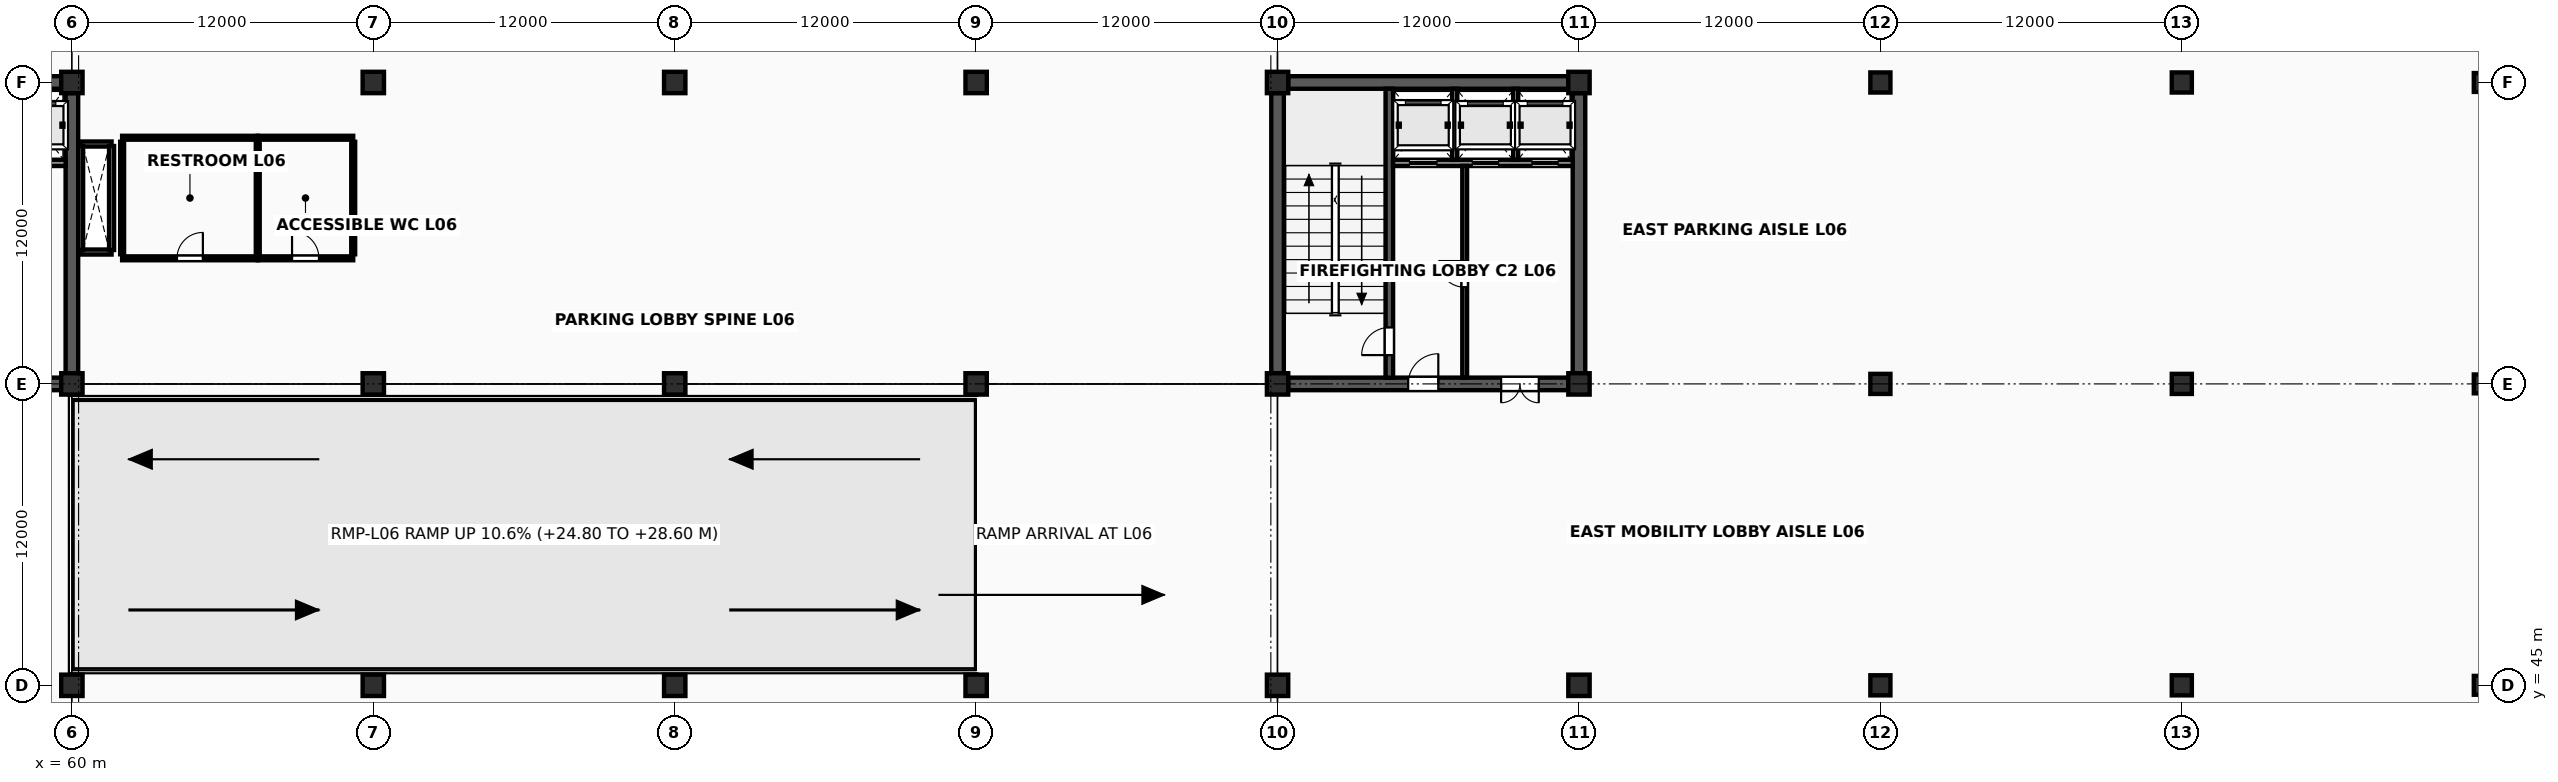
"""IFC4 building model, lengths in metres.
Left out: names, types, materials, properties, quantities, classifications, styles, units other than length and angle.
Written with IfcOpenShell. Run it as: python <this file> out.ifc"""

import sys

from ifc_helpers import new_model, si_unit, direction, frame, frame_2d, origin, origin_2d, place, context, subcontext, project, spatial, rectangle, extrude, element, fill, save


model = new_model("IFC4")
c1 = context("Model", 3, precision=1e-05, world=origin(), true_north=direction((0.0, 1.0)))
c2 = subcontext(c1, "Body", "Model", "MODEL_VIEW")
j1 = project(units=[si_unit("LENGTHUNIT", "METRE"), si_unit("PLANEANGLEUNIT", "RADIAN")], contexts=[c1])
p1 = place(None, origin())
s1 = spatial("IfcSite", under=j1, at=p1, CompositionType="ELEMENT")
p2 = place(p1, origin())
s2 = spatial("IfcBuilding", under=s1, at=p2, CompositionType="ELEMENT")
p3 = place(p2, frame((0.0, 0.0, 24.8)))
s3 = spatial("IfcBuildingStorey", under=s2, at=p3, CompositionType="ELEMENT", Elevation=24.8)
for number, where, z_axis, x_axis in (
    (1, (60.0, 45.0, 0.0), (0.0, 0.0, 1.0), (1.0, 0.0, 0.0)),
    (2, (60.0, 57.0, 0.0), (0.0, 0.0, 1.0), (1.0, 0.0, 0.0)),
    (3, (60.0, 69.0, 0.0), (0.0, 0.0, 1.0), (1.0, 0.0, 0.0)),
    (4, (72.0, 45.0, 0.0), (0.0, 0.0, 1.0), (1.0, 0.0, 0.0)),
    (5, (72.0, 57.0, 0.0), (0.0, 0.0, 1.0), (1.0, 0.0, 0.0)),
    (6, (72.0, 69.0, 0.0), (0.0, 0.0, 1.0), (1.0, 0.0, 0.0)),
    (7, (84.0, 45.0, 0.0), (0.0, 0.0, 1.0), (1.0, 0.0, 0.0)),
    (8, (84.0, 57.0, 0.0), (0.0, 0.0, 1.0), (1.0, 0.0, 0.0)),
    (9, (84.0, 69.0, 0.0), (0.0, 0.0, 1.0), (1.0, 0.0, 0.0)),
    (10, (96.0, 45.0, 0.0), (0.0, 0.0, 1.0), (1.0, 0.0, 0.0)),
    (11, (96.0, 57.0, 0.0), (0.0, 0.0, 1.0), (1.0, 0.0, 0.0)),
    (12, (96.0, 69.0, 0.0), (0.0, 0.0, 1.0), (1.0, 0.0, 0.0)),
    (13, (108.0, 45.0, 0.0), (0.0, 0.0, 1.0), (1.0, 0.0, 0.0)),
    (14, (108.0, 57.0, 0.0), (0.0, 0.0, 1.0), (1.0, 0.0, 0.0)),
    (15, (108.0, 69.0, 0.0), (0.0, 0.0, 1.0), (1.0, 0.0, 0.0)),
    (16, (120.0, 45.0, 0.0), (0.0, 0.0, 1.0), (1.0, 0.0, 0.0)),
    (17, (120.0, 57.0, 0.0), (0.0, 0.0, 1.0), (1.0, 0.0, 0.0)),
    (18, (120.0, 69.0, 0.0), (0.0, 0.0, 1.0), (1.0, 0.0, 0.0)),
):
    element("IfcColumn", number, at=place(p3, frame(where, z_axis=z_axis, x_axis=x_axis)), inside=s3, PredefinedType="COLUMN", context=c2, shape_type="SweptSolid", body=[
        extrude(rectangle(XDim=0.85, YDim=0.85, at=origin_2d()), origin(), (0.0, 0.0, 1.0), 3.8),
    ])
for number, where, z_axis, x_axis in (
    (19, (132.0, 45.0, 0.0), (0.0, 0.0, 1.0), (1.0, 0.0, 0.0)),
    (20, (132.0, 57.0, 0.0), (0.0, 0.0, 1.0), (1.0, 0.0, 0.0)),
    (21, (132.0, 69.0, 0.0), (0.0, 0.0, 1.0), (1.0, 0.0, 0.0)),
    (22, (144.0, 45.0, 0.0), (0.0, 0.0, 1.0), (1.0, 0.0, 0.0)),
    (23, (144.0, 57.0, 0.0), (0.0, 0.0, 1.0), (1.0, 0.0, 0.0)),
    (24, (144.0, 69.0, 0.0), (0.0, 0.0, 1.0), (1.0, 0.0, 0.0)),
):
    element("IfcColumn", number, at=place(p3, frame(where, z_axis=z_axis, x_axis=x_axis)), inside=s3, PredefinedType="COLUMN", context=c2, shape_type="SweptSolid", body=[
        extrude(rectangle(XDim=0.8, YDim=0.8, at=origin_2d()), origin(), (0.0, 0.0, 1.0), 3.8),
    ])
for number, where, z_axis, x_axis in (
    (25, (156.0, 45.0, 0.0), (0.0, 0.0, 1.0), (1.0, 0.0, 0.0)),
    (26, (156.0, 57.0, 0.0), (0.0, 0.0, 1.0), (1.0, 0.0, 0.0)),
    (27, (156.0, 69.0, 0.0), (0.0, 0.0, 1.0), (1.0, 0.0, 0.0)),
):
    element("IfcColumn", number, at=place(p3, frame(where, z_axis=z_axis, x_axis=x_axis)), inside=s3, PredefinedType="COLUMN", context=c2, shape_type="SweptSolid", body=[
        extrude(rectangle(XDim=0.75, YDim=0.75, at=origin_2d()), origin(), (0.0, 0.0, 1.0), 3.8),
    ])
for number, where, z_axis, x_axis in (
    (28, (60.347, 62.25, 0.0), (0.0, 0.0, 1.0), (1.0, 0.0, 0.0)),
    (29, (60.347, 66.55, 0.0), (0.0, 0.0, 1.0), (1.0, 0.0, 0.0)),
):
    element("IfcWall", number, at=place(p3, frame(where, z_axis=z_axis, x_axis=x_axis)), inside=s3, PredefinedType="SOLIDWALL", context=c2, shape_type="SweptSolid", body=[
        extrude(rectangle(XDim=1.233, YDim=0.2, at=frame_2d((0.617, 0.0))), origin(), (0.0, 0.0, 1.0), 3.628),
    ])
for number, where, z_axis, x_axis in (
    (30, (60.347, 62.33, 0.0), (0.0, 0.0, 1.0), (0.0, 1.0, 0.0)),
    (31, (61.58, 62.33, 0.0), (0.0, 0.0, 1.0), (0.0, 1.0, 0.0)),
):
    element("IfcWall", number, at=place(p3, frame(where, z_axis=z_axis, x_axis=x_axis)), inside=s3, PredefinedType="SOLIDWALL", context=c2, shape_type="SweptSolid", body=[
        extrude(rectangle(XDim=4.14, YDim=0.2, at=frame_2d((2.07, 0.0))), origin(), (0.0, 0.0, 1.0), 3.628),
    ])
p4 = place(p3, frame((48.422, 57.0, 0.0), z_axis=(0.0, 0.0, 1.0), x_axis=(1.0, 0.0, 0.0)))
e32 = element("IfcWall", 32, at=p4, inside=s3, PredefinedType="SHEAR", context=c2, shape_type="SweptSolid", body=[
    extrude(rectangle(XDim=11.156, YDim=0.5, at=frame_2d((5.578, 0.0))), origin(), (0.0, 0.0, 1.0), 3.628),
])
p5 = place(p4, frame((4.778, 0.0, 0.0)))
e33 = element("IfcOpeningElement", 33, at=p5, cuts=e32, PredefinedType="OPENING", context=c2, shape_type="SweptSolid", body=[
    extrude(rectangle(XDim=1.2, YDim=2.2, at=frame_2d((0.6, 1.1))), frame((0.0, 0.265, 0.0), z_axis=(0.0, -1.0, 0.0), x_axis=(1.0, 0.0, 0.0)), (0.0, 0.0, 1.0), 0.53),
])
p6 = place(p4, frame((8.478, 0.0, 0.0)))
e34 = element("IfcOpeningElement", 34, at=p6, cuts=e32, PredefinedType="OPENING", context=c2, shape_type="SweptSolid", body=[
    extrude(rectangle(XDim=1.5, YDim=2.25, at=frame_2d((0.75, 1.125))), frame((0.0, 0.265, 0.0), z_axis=(0.0, -1.0, 0.0), x_axis=(1.0, 0.0, 0.0)), (0.0, 0.0, 1.0), 0.53),
])
for number, where, z_axis, x_axis in (
    (35, (48.422, 69.0, 0.0), (0.0, 0.0, 1.0), (1.0, 0.0, 0.0)),
    (36, (60.0, 57.422, 0.0), (0.0, 0.0, 1.0), (0.0, 1.0, 0.0)),
):
    element("IfcWall", number, at=place(p3, frame(where, z_axis=z_axis, x_axis=x_axis)), inside=s3, PredefinedType="SHEAR", context=c2, shape_type="SweptSolid", body=[
        extrude(rectangle(XDim=11.156, YDim=0.5, at=frame_2d((5.578, 0.0))), origin(), (0.0, 0.0, 1.0), 3.628),
    ])
p7 = place(p3, frame((52.597, 65.8, 0.0), z_axis=(0.0, 0.0, 1.0), x_axis=(1.0, 0.0, 0.0)))
e37 = element("IfcWall", 37, at=p7, inside=s3, PredefinedType="SOLIDWALL", context=c2, shape_type="SweptSolid", body=[
    extrude(rectangle(XDim=7.156, YDim=0.25, at=frame_2d((3.578, 0.0))), origin(), (0.0, 0.0, 1.0), 3.628),
])
p8 = place(p7, frame((0.653, 0.0, 0.0)))
e38 = element("IfcOpeningElement", 38, at=p8, cuts=e37, PredefinedType="OPENING", context=c2, shape_type="SweptSolid", body=[
    extrude(rectangle(XDim=1.1, YDim=2.24, at=frame_2d((0.55, 1.12))), frame((0.0, 0.14, 0.0), z_axis=(0.0, -1.0, 0.0), x_axis=(1.0, 0.0, 0.0)), (0.0, 0.0, 1.0), 0.28),
])
p9 = place(p7, frame((3.153, 0.0, 0.0)))
e39 = element("IfcOpeningElement", 39, at=p9, cuts=e37, PredefinedType="OPENING", context=c2, shape_type="SweptSolid", body=[
    extrude(rectangle(XDim=1.05, YDim=2.2, at=frame_2d((0.525, 1.1))), frame((0.0, 0.14, 0.0), z_axis=(0.0, -1.0, 0.0), x_axis=(1.0, 0.0, 0.0)), (0.0, 0.0, 1.0), 0.28),
])
p10 = place(p7, frame((5.528, 0.0, 0.0)))
e40 = element("IfcOpeningElement", 40, at=p10, cuts=e37, PredefinedType="OPENING", context=c2, shape_type="SweptSolid", body=[
    extrude(rectangle(XDim=1.05, YDim=2.2, at=frame_2d((0.525, 1.1))), frame((0.0, 0.14, 0.0), z_axis=(0.0, -1.0, 0.0), x_axis=(1.0, 0.0, 0.0)), (0.0, 0.0, 1.0), 0.28),
])
p11 = place(p3, frame((108.422, 57.0, 0.0), z_axis=(0.0, 0.0, 1.0), x_axis=(1.0, 0.0, 0.0)))
e41 = element("IfcWall", 41, at=p11, inside=s3, PredefinedType="SHEAR", context=c2, shape_type="SweptSolid", body=[
    extrude(rectangle(XDim=11.156, YDim=0.5, at=frame_2d((5.578, 0.0))), origin(), (0.0, 0.0, 1.0), 3.628),
])
p12 = place(p11, frame((4.778, 0.0, 0.0)))
e42 = element("IfcOpeningElement", 42, at=p12, cuts=e41, PredefinedType="OPENING", context=c2, shape_type="SweptSolid", body=[
    extrude(rectangle(XDim=1.2, YDim=2.2, at=frame_2d((0.6, 1.1))), frame((0.0, 0.265, 0.0), z_axis=(0.0, -1.0, 0.0), x_axis=(1.0, 0.0, 0.0)), (0.0, 0.0, 1.0), 0.53),
])
p13 = place(p11, frame((8.478, 0.0, 0.0)))
e43 = element("IfcOpeningElement", 43, at=p13, cuts=e41, PredefinedType="OPENING", context=c2, shape_type="SweptSolid", body=[
    extrude(rectangle(XDim=1.5, YDim=2.25, at=frame_2d((0.75, 1.125))), frame((0.0, 0.265, 0.0), z_axis=(0.0, -1.0, 0.0), x_axis=(1.0, 0.0, 0.0)), (0.0, 0.0, 1.0), 0.53),
])
for number, where, z_axis, x_axis in (
    (44, (108.422, 69.0, 0.0), (0.0, 0.0, 1.0), (1.0, 0.0, 0.0)),
    (45, (108.0, 57.422, 0.0), (0.0, 0.0, 1.0), (0.0, 1.0, 0.0)),
    (46, (120.0, 57.422, 0.0), (0.0, 0.0, 1.0), (0.0, 1.0, 0.0)),
):
    element("IfcWall", number, at=place(p3, frame(where, z_axis=z_axis, x_axis=x_axis)), inside=s3, PredefinedType="SHEAR", context=c2, shape_type="SweptSolid", body=[
        extrude(rectangle(XDim=11.156, YDim=0.5, at=frame_2d((5.578, 0.0))), origin(), (0.0, 0.0, 1.0), 3.628),
    ])
p14 = place(p3, frame((112.45, 57.247, 0.0), z_axis=(0.0, 0.0, 1.0), x_axis=(0.0, 1.0, 0.0)))
e47 = element("IfcWall", 47, at=p14, inside=s3, PredefinedType="SHEAR", context=c2, shape_type="SweptSolid", body=[
    extrude(rectangle(XDim=11.506, YDim=0.3, at=frame_2d((5.753, 0.0))), origin(), (0.0, 0.0, 1.0), 3.628),
])
p15 = place(p14, frame((0.9, 0.0, 0.0)))
e48 = element("IfcOpeningElement", 48, at=p15, cuts=e47, PredefinedType="OPENING", context=c2, shape_type="SweptSolid", body=[
    extrude(rectangle(XDim=1.1, YDim=2.2, at=frame_2d((0.55, 1.1))), frame((0.0, 0.165, 0.0), z_axis=(0.0, -1.0, 0.0), x_axis=(1.0, 0.0, 0.0)), (0.0, 0.0, 1.0), 0.33),
])
p16 = place(p3, frame((112.597, 65.8, 0.0), z_axis=(0.0, 0.0, 1.0), x_axis=(1.0, 0.0, 0.0)))
e49 = element("IfcWall", 49, at=p16, inside=s3, PredefinedType="SOLIDWALL", context=c2, shape_type="SweptSolid", body=[
    extrude(rectangle(XDim=7.156, YDim=0.25, at=frame_2d((3.578, 0.0))), origin(), (0.0, 0.0, 1.0), 3.628),
])
p17 = place(p16, frame((0.653, 0.0, 0.0)))
e50 = element("IfcOpeningElement", 50, at=p17, cuts=e49, PredefinedType="OPENING", context=c2, shape_type="SweptSolid", body=[
    extrude(rectangle(XDim=1.1, YDim=2.24, at=frame_2d((0.55, 1.12))), frame((0.0, 0.14, 0.0), z_axis=(0.0, -1.0, 0.0), x_axis=(1.0, 0.0, 0.0)), (0.0, 0.0, 1.0), 0.28),
])
p18 = place(p16, frame((3.153, 0.0, 0.0)))
e51 = element("IfcOpeningElement", 51, at=p18, cuts=e49, PredefinedType="OPENING", context=c2, shape_type="SweptSolid", body=[
    extrude(rectangle(XDim=1.05, YDim=2.2, at=frame_2d((0.525, 1.1))), frame((0.0, 0.14, 0.0), z_axis=(0.0, -1.0, 0.0), x_axis=(1.0, 0.0, 0.0)), (0.0, 0.0, 1.0), 0.28),
])
p19 = place(p16, frame((5.528, 0.0, 0.0)))
e52 = element("IfcOpeningElement", 52, at=p19, cuts=e49, PredefinedType="OPENING", context=c2, shape_type="SweptSolid", body=[
    extrude(rectangle(XDim=1.05, YDim=2.2, at=frame_2d((0.525, 1.1))), frame((0.0, 0.14, 0.0), z_axis=(0.0, -1.0, 0.0), x_axis=(1.0, 0.0, 0.0)), (0.0, 0.0, 1.0), 0.28),
])
for number, where, z_axis, x_axis in (
    (53, (115.05, 65.92, 0.0), (0.0, 0.0, 1.0), (0.0, 1.0, 0.0)),
    (54, (117.48, 65.92, 0.0), (0.0, 0.0, 1.0), (0.0, 1.0, 0.0)),
):
    element("IfcWall", number, at=place(p3, frame(where, z_axis=z_axis, x_axis=x_axis)), inside=s3, PredefinedType="SOLIDWALL", context=c2, shape_type="SweptSolid", body=[
        extrude(rectangle(XDim=2.83, YDim=0.2, at=frame_2d((1.415, 0.0))), origin(), (0.0, 0.0, 1.0), 3.618),
    ])
p20 = place(p3, frame((115.45, 57.25, 0.0), z_axis=(0.0, 0.0, 1.0), x_axis=(0.0, 1.0, 0.0)))
e55 = element("IfcWall", 55, at=p20, inside=s3, PredefinedType="SOLIDWALL", context=c2, shape_type="SweptSolid", body=[
    extrude(rectangle(XDim=8.43, YDim=0.19, at=frame_2d((4.215, 0.0))), origin(), (0.0, 0.0, 1.0), 3.618),
])
p21 = place(p20, frame((3.6, 0.0, 0.0)))
e56 = element("IfcOpeningElement", 56, at=p21, cuts=e55, PredefinedType="OPENING", context=c2, shape_type="SweptSolid", body=[
    extrude(rectangle(XDim=1.04, YDim=2.18, at=frame_2d((0.52, 1.09))), frame((0.0, 0.11, 0.0), z_axis=(0.0, -1.0, 0.0), x_axis=(1.0, 0.0, 0.0)), (0.0, 0.0, 1.0), 0.22),
])
p22 = place(p3, frame((62.0, 62.0, 0.0), z_axis=(0.0, 0.0, 1.0), x_axis=(1.0, 0.0, 0.0)))
e57 = element("IfcWall", 57, at=p22, inside=s3, PredefinedType="PLUMBINGWALL", context=c2, shape_type="SweptSolid", body=[
    extrude(rectangle(XDim=5.4, YDim=0.155, at=frame_2d((2.7, 0.0))), origin(), (0.0, 0.0, 1.0), 2.75),
])
p23 = place(p22, frame((2.185, 0.0, 0.0)))
e58 = element("IfcOpeningElement", 58, at=p23, cuts=e57, PredefinedType="OPENING", context=c2, shape_type="SweptSolid", body=[
    extrude(rectangle(XDim=1.03, YDim=2.17, at=frame_2d((0.515, 1.085))), frame((0.0, 0.093, 0.0), z_axis=(0.0, -1.0, 0.0), x_axis=(1.0, 0.0, 0.0)), (0.0, 0.0, 1.0), 0.185),
])
p24 = place(p3, frame((62.0, 66.8, 0.0), z_axis=(0.0, 0.0, 1.0), x_axis=(1.0, 0.0, 0.0)))
e59 = element("IfcWall", 59, at=p24, inside=s3, PredefinedType="PLUMBINGWALL", context=c2, shape_type="SweptSolid", body=[
    extrude(rectangle(XDim=5.4, YDim=0.155, at=frame_2d((2.7, 0.0))), origin(), (0.0, 0.0, 1.0), 2.75),
])
for number, where, z_axis, x_axis in (
    (60, (62.0, 62.16, 0.0), (0.0, 0.0, 1.0), (0.0, 1.0, 0.0)),
    (61, (67.4, 62.16, 0.0), (0.0, 0.0, 1.0), (0.0, 1.0, 0.0)),
):
    element("IfcWall", number, at=place(p3, frame(where, z_axis=z_axis, x_axis=x_axis)), inside=s3, PredefinedType="PLUMBINGWALL", context=c2, shape_type="SweptSolid", body=[
        extrude(rectangle(XDim=4.48, YDim=0.155, at=frame_2d((2.24, 0.0))), origin(), (0.0, 0.0, 1.0), 2.75),
    ])
p25 = place(p3, frame((67.4, 62.0, 0.0), z_axis=(0.0, 0.0, 1.0), x_axis=(1.0, 0.0, 0.0)))
e62 = element("IfcWall", 62, at=p25, inside=s3, PredefinedType="PLUMBINGWALL", context=c2, shape_type="SweptSolid", body=[
    extrude(rectangle(XDim=3.8, YDim=0.155, at=frame_2d((1.9, 0.0))), origin(), (0.0, 0.0, 1.0), 2.75),
])
p26 = place(p25, frame((1.365, 0.0, 0.0)))
e63 = element("IfcOpeningElement", 63, at=p26, cuts=e62, PredefinedType="OPENING", context=c2, shape_type="SweptSolid", body=[
    extrude(rectangle(XDim=1.07, YDim=2.19, at=frame_2d((0.535, 1.095))), frame((0.0, 0.093, 0.0), z_axis=(0.0, -1.0, 0.0), x_axis=(1.0, 0.0, 0.0)), (0.0, 0.0, 1.0), 0.185),
])
p27 = place(p3, frame((67.4, 66.8, 0.0), z_axis=(0.0, 0.0, 1.0), x_axis=(1.0, 0.0, 0.0)))
e64 = element("IfcWall", 64, at=p27, inside=s3, PredefinedType="PLUMBINGWALL", context=c2, shape_type="SweptSolid", body=[
    extrude(rectangle(XDim=3.8, YDim=0.155, at=frame_2d((1.9, 0.0))), origin(), (0.0, 0.0, 1.0), 2.75),
])
p28 = place(p3, frame((71.2, 62.16, 0.0), z_axis=(0.0, 0.0, 1.0), x_axis=(0.0, 1.0, 0.0)))
e65 = element("IfcWall", 65, at=p28, inside=s3, PredefinedType="PLUMBINGWALL", context=c2, shape_type="SweptSolid", body=[
    extrude(rectangle(XDim=4.48, YDim=0.155, at=frame_2d((2.24, 0.0))), origin(), (0.0, 0.0, 1.0), 2.75),
])
p29 = place(p15, origin())
e66 = element("IfcDoor", 66, at=p29, inside=s3, OperationType="SINGLE_SWING_LEFT", PredefinedType="DOOR", context=c2, shape_type="SweptSolid", body=[
    extrude(rectangle(XDim=1.1, YDim=2.2, at=frame_2d((0.55, 1.1))), frame((0.0, 0.025, 0.0), z_axis=(0.0, -1.0, 0.0), x_axis=(1.0, 0.0, 0.0)), (0.0, 0.0, 1.0), 0.05),
])
fill(e48, e66)
p30 = place(p21, origin())
e67 = element("IfcDoor", 67, at=p30, inside=s3, OperationType="SINGLE_SWING_RIGHT", PredefinedType="DOOR", context=c2, shape_type="SweptSolid", body=[
    extrude(rectangle(XDim=1.04, YDim=2.18, at=frame_2d((0.52, 1.09))), frame((0.0, 0.025, 0.0), z_axis=(0.0, -1.0, 0.0), x_axis=(1.0, 0.0, 0.0)), (0.0, 0.0, 1.0), 0.05),
])
fill(e56, e67)
p31 = place(p12, origin())
e68 = element("IfcDoor", 68, at=p31, inside=s3, OperationType="SINGLE_SWING_RIGHT", PredefinedType="DOOR", context=c2, shape_type="SweptSolid", body=[
    extrude(rectangle(XDim=1.2, YDim=2.2, at=frame_2d((0.6, 1.1))), frame((0.0, 0.025, 0.0), z_axis=(0.0, -1.0, 0.0), x_axis=(1.0, 0.0, 0.0)), (0.0, 0.0, 1.0), 0.05),
])
fill(e42, e68)
p32 = place(p13, origin())
e69 = element("IfcDoor", 69, at=p32, inside=s3, OperationType="DOUBLE_DOOR_SINGLE_SWING", PredefinedType="DOOR", context=c2, shape_type="SweptSolid", body=[
    extrude(rectangle(XDim=1.5, YDim=2.25, at=frame_2d((0.75, 1.125))), frame((0.0, 0.025, 0.0), z_axis=(0.0, -1.0, 0.0), x_axis=(1.0, 0.0, 0.0)), (0.0, 0.0, 1.0), 0.05),
])
fill(e43, e69)
p33 = place(p17, origin())
e70 = element("IfcDoor", 70, at=p33, inside=s3, OperationType="SLIDING_TO_LEFT", PredefinedType="USERDEFINED", context=c2, shape_type="SweptSolid", body=[
    extrude(rectangle(XDim=1.1, YDim=2.24, at=frame_2d((0.55, 1.12))), frame((0.0, 0.025, 0.0), z_axis=(0.0, -1.0, 0.0), x_axis=(1.0, 0.0, 0.0)), (0.0, 0.0, 1.0), 0.05),
])
fill(e50, e70)
p34 = place(p18, origin())
e71 = element("IfcDoor", 71, at=p34, inside=s3, OperationType="SLIDING_TO_LEFT", PredefinedType="USERDEFINED", context=c2, shape_type="SweptSolid", body=[
    extrude(rectangle(XDim=1.05, YDim=2.2, at=frame_2d((0.525, 1.1))), frame((0.0, 0.025, 0.0), z_axis=(0.0, -1.0, 0.0), x_axis=(1.0, 0.0, 0.0)), (0.0, 0.0, 1.0), 0.05),
])
fill(e51, e71)
p35 = place(p19, origin())
e72 = element("IfcDoor", 72, at=p35, inside=s3, OperationType="SLIDING_TO_LEFT", PredefinedType="USERDEFINED", context=c2, shape_type="SweptSolid", body=[
    extrude(rectangle(XDim=1.05, YDim=2.2, at=frame_2d((0.525, 1.1))), frame((0.0, 0.025, 0.0), z_axis=(0.0, -1.0, 0.0), x_axis=(1.0, 0.0, 0.0)), (0.0, 0.0, 1.0), 0.05),
])
fill(e52, e72)
p36 = place(p23, origin())
e73 = element("IfcDoor", 73, at=p36, inside=s3, OperationType="SINGLE_SWING_RIGHT", PredefinedType="DOOR", context=c2, shape_type="SweptSolid", body=[
    extrude(rectangle(XDim=1.03, YDim=2.17, at=frame_2d((0.515, 1.085))), frame((0.0, 0.025, 0.0), z_axis=(0.0, -1.0, 0.0), x_axis=(1.0, 0.0, 0.0)), (0.0, 0.0, 1.0), 0.05),
])
fill(e58, e73)
p37 = place(p26, origin())
e74 = element("IfcDoor", 74, at=p37, inside=s3, OperationType="SINGLE_SWING_LEFT", PredefinedType="DOOR", context=c2, shape_type="SweptSolid", body=[
    extrude(rectangle(XDim=1.07, YDim=2.19, at=frame_2d((0.535, 1.095))), frame((0.0, 0.025, 0.0), z_axis=(0.0, -1.0, 0.0), x_axis=(1.0, 0.0, 0.0)), (0.0, 0.0, 1.0), 0.05),
])
fill(e63, e74)
save(model, sys.argv[1])
